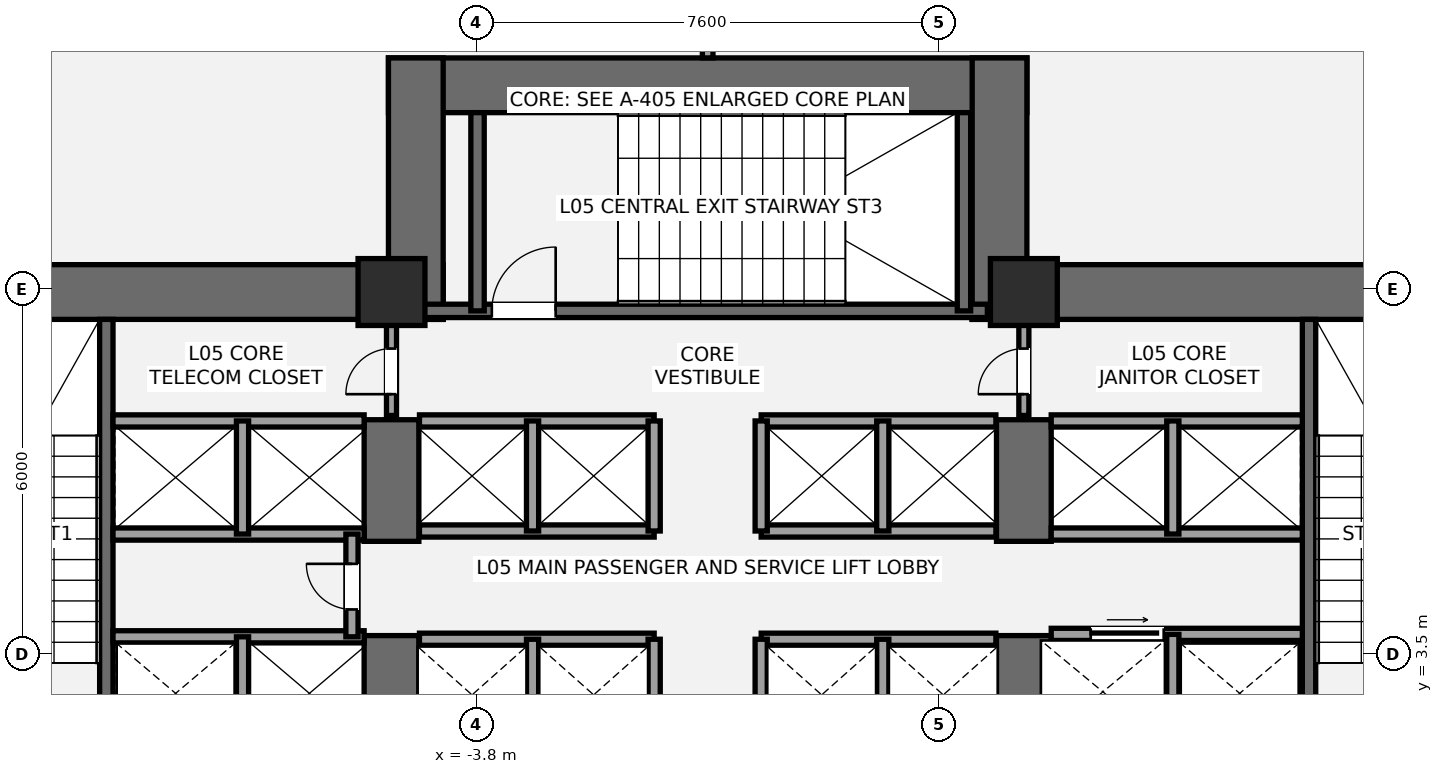
"""IFC4 building model, lengths in metres.
Left out: names, types, materials, properties, quantities, classifications, styles, units other than length and angle.
Written with IfcOpenShell. Run it as: python <this file> out.ifc"""

import sys

from ifc_helpers import new_model, si_unit, direction, frame, frame_2d, origin, origin_2d, place, context, subcontext, project, spatial, rectangle, extrude, element, fill, save


model = new_model("IFC4")
c1 = context("Model", 3, precision=1e-05, world=origin(), true_north=direction((0.0, 1.0)))
c2 = subcontext(c1, "Body", "Model", "MODEL_VIEW")
j1 = project(units=[si_unit("LENGTHUNIT", "METRE"), si_unit("PLANEANGLEUNIT", "RADIAN")], contexts=[c1])
p1 = place(None, origin())
s1 = spatial("IfcSite", under=j1, at=p1, CompositionType="ELEMENT")
p2 = place(p1, origin())
s2 = spatial("IfcBuilding", under=s1, at=p2, CompositionType="ELEMENT")
p3 = place(p2, frame((0.0, 0.0, 22.8)))
s3 = spatial("IfcBuildingStorey", under=s2, at=p3, CompositionType="ELEMENT", Elevation=22.8)
p4 = place(p3, frame((-14.05, 9.45, 0.0), z_axis=(0.0, 0.0, 1.0), x_axis=(1.0, 0.0, 0.0)))
e1 = element("IfcWall", 1, at=p4, inside=s3, PredefinedType="SHEAR", context=c2, shape_type="SweptSolid", body=[
    extrude(rectangle(XDim=9.7, YDim=0.9, at=frame_2d((4.85, 0.0))), origin(), (0.0, 0.0, 1.0), 4.2),
])
p5 = place(p3, frame((-5.2, 0.95, 0.0), z_axis=(0.0, 0.0, 1.0), x_axis=(0.0, 1.0, 0.0)))
e2 = element("IfcWall", 2, at=p5, inside=s3, PredefinedType="SHEAR", context=c2, shape_type="SweptSolid", body=[
    extrude(rectangle(XDim=2.85, YDim=0.9, at=frame_2d((1.425, 0.0))), origin(), (0.0, 0.0, 1.0), 4.2),
])
p6 = place(p3, frame((-5.2, 5.35, 0.0), z_axis=(0.0, 0.0, 1.0), x_axis=(0.0, 1.0, 0.0)))
e3 = element("IfcWall", 3, at=p6, inside=s3, PredefinedType="SHEAR", context=c2, shape_type="SweptSolid", body=[
    extrude(rectangle(XDim=2.0, YDim=0.9, at=frame_2d((1.0, 0.0))), origin(), (0.0, 0.0, 1.0), 4.2),
])
p7 = place(p3, frame((-9.89, 1.85, 0.0), z_axis=(0.0, 0.0, 1.0), x_axis=(0.0, 1.0, 0.0)))
e4 = element("IfcWall", 4, at=p7, inside=s3, PredefinedType="SHEAR", context=c2, shape_type="SweptSolid", body=[
    extrude(rectangle(XDim=7.15, YDim=0.22, at=frame_2d((3.575, 0.0))), origin(), (0.0, 0.0, 1.0), 4.2),
])
p8 = place(p3, frame((4.35, 9.45, 0.0), z_axis=(0.0, 0.0, 1.0), x_axis=(1.0, 0.0, 0.0)))
e5 = element("IfcWall", 5, at=p8, inside=s3, PredefinedType="SHEAR", context=c2, shape_type="SweptSolid", body=[
    extrude(rectangle(XDim=9.7, YDim=0.9, at=frame_2d((4.85, 0.0))), origin(), (0.0, 0.0, 1.0), 4.2),
])
p9 = place(p3, frame((5.2, 0.95, 0.0), z_axis=(0.0, 0.0, 1.0), x_axis=(0.0, 1.0, 0.0)))
e6 = element("IfcWall", 6, at=p9, inside=s3, PredefinedType="SHEAR", context=c2, shape_type="SweptSolid", body=[
    extrude(rectangle(XDim=2.85, YDim=0.9, at=frame_2d((1.425, 0.0))), origin(), (0.0, 0.0, 1.0), 4.2),
])
p10 = place(p3, frame((5.2, 5.35, 0.0), z_axis=(0.0, 0.0, 1.0), x_axis=(0.0, 1.0, 0.0)))
e7 = element("IfcWall", 7, at=p10, inside=s3, PredefinedType="SHEAR", context=c2, shape_type="SweptSolid", body=[
    extrude(rectangle(XDim=2.0, YDim=0.9, at=frame_2d((1.0, 0.0))), origin(), (0.0, 0.0, 1.0), 4.2),
])
p11 = place(p3, frame((9.89, 1.85, 0.0), z_axis=(0.0, 0.0, 1.0), x_axis=(0.0, 1.0, 0.0)))
e8 = element("IfcWall", 8, at=p11, inside=s3, PredefinedType="SHEAR", context=c2, shape_type="SweptSolid", body=[
    extrude(rectangle(XDim=7.15, YDim=0.22, at=frame_2d((3.575, 0.0))), origin(), (0.0, 0.0, 1.0), 4.2),
])
p12 = place(p3, frame((-5.25, 12.85, 0.0), z_axis=(0.0, 0.0, 1.0), x_axis=(1.0, 0.0, 0.0)))
e9 = element("IfcWall", 9, at=p12, inside=s3, PredefinedType="SHEAR", context=c2, shape_type="SweptSolid", body=[
    extrude(rectangle(XDim=10.5, YDim=0.9, at=frame_2d((5.25, 0.0))), origin(), (0.0, 0.0, 1.0), 4.2),
])
for number, where, z_axis, x_axis in (
    (10, (-4.8, 9.0, 0.0), (0.0, 0.0, 1.0), (0.0, 1.0, 0.0)),
    (11, (4.8, 9.0, 0.0), (0.0, 0.0, 1.0), (0.0, 1.0, 0.0)),
):
    element("IfcWall", number, at=place(p3, frame(where, z_axis=z_axis, x_axis=x_axis)), inside=s3, PredefinedType="SHEAR", context=c2, shape_type="SweptSolid", body=[
        extrude(rectangle(XDim=4.3, YDim=0.9, at=frame_2d((2.15, 0.0))), origin(), (0.0, 0.0, 1.0), 4.2),
    ])
p13 = place(p3, frame((-4.7, 9.14, 0.0), z_axis=(0.0, 0.0, 1.0), x_axis=(1.0, 0.0, 0.0)))
e12 = element("IfcWall", 12, at=p13, inside=s3, PredefinedType="SHEAR", context=c2, shape_type="SweptSolid", body=[
    extrude(rectangle(XDim=9.3, YDim=0.22, at=frame_2d((4.65, 0.0))), origin(), (0.0, 0.0, 1.0), 4.2),
])
p14 = place(p13, frame((1.15, 0.0, 0.0)))
e13 = element("IfcOpeningElement", 13, at=p14, cuts=e12, PredefinedType="OPENING", context=c2, shape_type="SweptSolid", body=[
    extrude(rectangle(XDim=1.05, YDim=2.15, at=frame_2d((0.525, 1.075))), frame((0.0, 0.12, 0.0), z_axis=(0.0, -1.0, 0.0), x_axis=(1.0, 0.0, 0.0)), (0.0, 0.0, 1.0), 0.24),
])
for number, where, z_axis, x_axis in (
    (14, (-3.785, 9.14, 0.0), (0.0, 0.0, 1.0), (0.0, 1.0, 0.0)),
    (15, (4.215, 9.14, 0.0), (0.0, 0.0, 1.0), (0.0, 1.0, 0.0)),
):
    element("IfcWall", number, at=place(p3, frame(where, z_axis=z_axis, x_axis=x_axis)), inside=s3, PredefinedType="SHEAR", context=c2, shape_type="SweptSolid", body=[
        extrude(rectangle(XDim=3.26, YDim=0.22, at=frame_2d((1.63, 0.0))), origin(), (0.0, 0.0, 1.0), 4.2),
    ])
for number, where, z_axis, x_axis in (
    (16, (-5.2, 9.45, 0.0), (0.0, 0.0, 1.0), (1.0, 0.0, 0.0)),
    (17, (5.2, 9.45, 0.0), (0.0, 0.0, 1.0), (1.0, 0.0, 0.0)),
):
    element("IfcColumn", number, at=place(p3, frame(where, z_axis=z_axis, x_axis=x_axis)), inside=s3, PredefinedType="COLUMN", context=c2, shape_type="SweptSolid", body=[
        extrude(rectangle(XDim=1.1, YDim=1.1, at=origin_2d()), origin(), (0.0, 0.0, 1.0), 4.2),
    ])
p15 = place(p3, frame((-9.78, 3.78, 0.0), z_axis=(0.0, 0.0, 1.0), x_axis=(1.0, 0.0, 0.0)))
e18 = element("IfcWall", 18, at=p15, inside=s3, PredefinedType="SOLIDWALL", context=c2, shape_type="SweptSolid", body=[
    extrude(rectangle(XDim=4.13, YDim=0.2, at=frame_2d((2.065, 0.0))), origin(), (0.0, 0.0, 1.0), 3.9),
])
p16 = place(p3, frame((-7.65, 1.85, 0.0), z_axis=(0.0, 0.0, 1.0), x_axis=(0.0, 1.0, 0.0)))
e19 = element("IfcWall", 19, at=p16, inside=s3, PredefinedType="SOLIDWALL", context=c2, shape_type="SweptSolid", body=[
    extrude(rectangle(XDim=1.93, YDim=0.2, at=frame_2d((0.965, 0.0))), origin(), (0.0, 0.0, 1.0), 3.9),
])
for number, where, z_axis, x_axis in (
    (20, (-9.78, 5.47, 0.0), (0.0, 0.0, 1.0), (1.0, 0.0, 0.0)),
    (21, (-9.78, 7.33, 0.0), (0.0, 0.0, 1.0), (1.0, 0.0, 0.0)),
):
    element("IfcWall", number, at=place(p3, frame(where, z_axis=z_axis, x_axis=x_axis)), inside=s3, PredefinedType="SOLIDWALL", context=c2, shape_type="SweptSolid", body=[
        extrude(rectangle(XDim=4.13, YDim=0.2, at=frame_2d((2.065, 0.0))), origin(), (0.0, 0.0, 1.0), 3.9),
    ])
p17 = place(p3, frame((-7.65, 5.47, 0.0), z_axis=(0.0, 0.0, 1.0), x_axis=(0.0, 1.0, 0.0)))
e22 = element("IfcWall", 22, at=p17, inside=s3, PredefinedType="SOLIDWALL", context=c2, shape_type="SweptSolid", body=[
    extrude(rectangle(XDim=1.86, YDim=0.2, at=frame_2d((0.93, 0.0))), origin(), (0.0, 0.0, 1.0), 3.9),
])
p18 = place(p3, frame((-5.85, 3.78, 0.0), z_axis=(0.0, 0.0, 1.0), x_axis=(0.0, 1.0, 0.0)))
e23 = element("IfcWall", 23, at=p18, inside=s3, PredefinedType="SOLIDWALL", context=c2, shape_type="SweptSolid", body=[
    extrude(rectangle(XDim=1.69, YDim=0.2, at=frame_2d((0.845, 0.0))), origin(), (0.0, 0.0, 1.0), 3.9),
])
p19 = place(p18, frame((0.45, 0.0, 0.0)))
e24 = element("IfcOpeningElement", 24, at=p19, cuts=e23, PredefinedType="OPENING", context=c2, shape_type="SweptSolid", body=[
    extrude(rectangle(XDim=0.75, YDim=2.1, at=frame_2d((0.375, 1.05))), frame((0.0, 0.11, 0.0), z_axis=(0.0, -1.0, 0.0), x_axis=(1.0, 0.0, 0.0)), (0.0, 0.0, 1.0), 0.22),
])
p20 = place(p3, frame((5.65, 3.82, 0.0), z_axis=(0.0, 0.0, 1.0), x_axis=(1.0, 0.0, 0.0)))
e25 = element("IfcWall", 25, at=p20, inside=s3, PredefinedType="SOLIDWALL", context=c2, shape_type="SweptSolid", body=[
    extrude(rectangle(XDim=4.13, YDim=0.2, at=frame_2d((2.065, 0.0))), origin(), (0.0, 0.0, 1.0), 3.9),
])
p21 = place(p20, frame((0.65, 0.0, 0.0)))
e26 = element("IfcOpeningElement", 26, at=p21, cuts=e25, PredefinedType="OPENING", context=c2, shape_type="SweptSolid", body=[
    extrude(rectangle(XDim=1.2, YDim=2.2, at=frame_2d((0.6, 1.1))), frame((0.0, 0.11, 0.0), z_axis=(0.0, -1.0, 0.0), x_axis=(1.0, 0.0, 0.0)), (0.0, 0.0, 1.0), 0.22),
])
p22 = place(p3, frame((7.65, 1.85, 0.0), z_axis=(0.0, 0.0, 1.0), x_axis=(0.0, 1.0, 0.0)))
e27 = element("IfcWall", 27, at=p22, inside=s3, PredefinedType="SOLIDWALL", context=c2, shape_type="SweptSolid", body=[
    extrude(rectangle(XDim=1.97, YDim=0.2, at=frame_2d((0.985, 0.0))), origin(), (0.0, 0.0, 1.0), 3.9),
])
for number, where, z_axis, x_axis in (
    (28, (5.65, 5.47, 0.0), (0.0, 0.0, 1.0), (1.0, 0.0, 0.0)),
    (29, (5.65, 7.33, 0.0), (0.0, 0.0, 1.0), (1.0, 0.0, 0.0)),
):
    element("IfcWall", number, at=place(p3, frame(where, z_axis=z_axis, x_axis=x_axis)), inside=s3, PredefinedType="SOLIDWALL", context=c2, shape_type="SweptSolid", body=[
        extrude(rectangle(XDim=4.13, YDim=0.2, at=frame_2d((2.065, 0.0))), origin(), (0.0, 0.0, 1.0), 3.9),
    ])
p23 = place(p3, frame((7.65, 5.47, 0.0), z_axis=(0.0, 0.0, 1.0), x_axis=(0.0, 1.0, 0.0)))
e30 = element("IfcWall", 30, at=p23, inside=s3, PredefinedType="SOLIDWALL", context=c2, shape_type="SweptSolid", body=[
    extrude(rectangle(XDim=1.86, YDim=0.2, at=frame_2d((0.93, 0.0))), origin(), (0.0, 0.0, 1.0), 3.9),
])
for number, where, z_axis, x_axis in (
    (31, (-4.74, 3.74, 0.0), (0.0, 0.0, 1.0), (1.0, 0.0, 0.0)),
    (32, (0.88, 3.74, 0.0), (0.0, 0.0, 1.0), (1.0, 0.0, 0.0)),
):
    element("IfcWall", number, at=place(p3, frame(where, z_axis=z_axis, x_axis=x_axis)), inside=s3, PredefinedType="SOLIDWALL", context=c2, shape_type="SweptSolid", body=[
        extrude(rectangle(XDim=3.86, YDim=0.2, at=frame_2d((1.93, 0.0))), origin(), (0.0, 0.0, 1.0), 3.9),
    ])
for number, where, z_axis, x_axis in (
    (33, (-2.88, 1.92, 0.0), (0.0, 0.0, 1.0), (0.0, 1.0, 0.0)),
    (34, (2.88, 1.92, 0.0), (0.0, 0.0, 1.0), (0.0, 1.0, 0.0)),
    (35, (-0.88, 1.92, 0.0), (0.0, 0.0, 1.0), (0.0, 1.0, 0.0)),
    (36, (0.88, 1.92, 0.0), (0.0, 0.0, 1.0), (0.0, 1.0, 0.0)),
):
    element("IfcWall", number, at=place(p3, frame(where, z_axis=z_axis, x_axis=x_axis)), inside=s3, PredefinedType="SOLIDWALL", context=c2, shape_type="SweptSolid", body=[
        extrude(rectangle(XDim=1.82, YDim=0.2, at=frame_2d((0.91, 0.0))), origin(), (0.0, 0.0, 1.0), 3.9),
    ])
for number, where, z_axis, x_axis in (
    (37, (-4.74, 5.52, 0.0), (0.0, 0.0, 1.0), (1.0, 0.0, 0.0)),
    (38, (0.88, 5.52, 0.0), (0.0, 0.0, 1.0), (1.0, 0.0, 0.0)),
    (39, (-4.74, 7.33, 0.0), (0.0, 0.0, 1.0), (1.0, 0.0, 0.0)),
    (40, (0.88, 7.33, 0.0), (0.0, 0.0, 1.0), (1.0, 0.0, 0.0)),
):
    element("IfcWall", number, at=place(p3, frame(where, z_axis=z_axis, x_axis=x_axis)), inside=s3, PredefinedType="SOLIDWALL", context=c2, shape_type="SweptSolid", body=[
        extrude(rectangle(XDim=3.86, YDim=0.2, at=frame_2d((1.93, 0.0))), origin(), (0.0, 0.0, 1.0), 3.9),
    ])
for number, where, z_axis, x_axis in (
    (41, (-2.88, 5.52, 0.0), (0.0, 0.0, 1.0), (0.0, 1.0, 0.0)),
    (42, (2.88, 5.52, 0.0), (0.0, 0.0, 1.0), (0.0, 1.0, 0.0)),
    (43, (-0.88, 5.52, 0.0), (0.0, 0.0, 1.0), (0.0, 1.0, 0.0)),
    (44, (0.88, 5.52, 0.0), (0.0, 0.0, 1.0), (0.0, 1.0, 0.0)),
):
    element("IfcWall", number, at=place(p3, frame(where, z_axis=z_axis, x_axis=x_axis)), inside=s3, PredefinedType="SOLIDWALL", context=c2, shape_type="SweptSolid", body=[
        extrude(rectangle(XDim=1.81, YDim=0.2, at=frame_2d((0.905, 0.0))), origin(), (0.0, 0.0, 1.0), 3.9),
    ])
p24 = place(p3, frame((-5.2, 7.42, 0.0), z_axis=(0.0, 0.0, 1.0), x_axis=(0.0, 1.0, 0.0)))
e45 = element("IfcWall", 45, at=p24, inside=s3, PredefinedType="PARTITIONING", context=c2, shape_type="SweptSolid", body=[
    extrude(rectangle(XDim=1.58, YDim=0.165, at=frame_2d((0.79, 0.0))), origin(), (0.0, 0.0, 1.0), 3.9),
])
p25 = place(p24, frame((0.35, 0.0, 0.0)))
e46 = element("IfcOpeningElement", 46, at=p25, cuts=e45, PredefinedType="OPENING", context=c2, shape_type="SweptSolid", body=[
    extrude(rectangle(XDim=0.75, YDim=2.1, at=frame_2d((0.375, 1.05))), frame((0.0, 0.093, 0.0), z_axis=(0.0, -1.0, 0.0), x_axis=(1.0, 0.0, 0.0)), (0.0, 0.0, 1.0), 0.185),
])
p26 = place(p3, frame((5.2, 7.42, 0.0), z_axis=(0.0, 0.0, 1.0), x_axis=(0.0, 1.0, 0.0)))
e47 = element("IfcWall", 47, at=p26, inside=s3, PredefinedType="PARTITIONING", context=c2, shape_type="SweptSolid", body=[
    extrude(rectangle(XDim=1.58, YDim=0.165, at=frame_2d((0.79, 0.0))), origin(), (0.0, 0.0, 1.0), 3.9),
])
p27 = place(p26, frame((0.35, 0.0, 0.0)))
e48 = element("IfcOpeningElement", 48, at=p27, cuts=e47, PredefinedType="OPENING", context=c2, shape_type="SweptSolid", body=[
    extrude(rectangle(XDim=0.75, YDim=2.1, at=frame_2d((0.375, 1.05))), frame((0.0, 0.093, 0.0), z_axis=(0.0, -1.0, 0.0), x_axis=(1.0, 0.0, 0.0)), (0.0, 0.0, 1.0), 0.185),
])
p28 = place(p3, frame((0.0, 13.3, 0.0), z_axis=(0.0, 0.0, 1.0), x_axis=(0.0, 1.0, 0.0)))
e49 = element("IfcWall", 49, at=p28, inside=s3, PredefinedType="PARTITIONING", context=c2, shape_type="SweptSolid", body=[
    extrude(rectangle(XDim=8.106, YDim=0.175, at=frame_2d((4.053, 0.0))), origin(), (0.0, 0.0, 1.0), 2.09),
])
p29 = place(p14, origin())
e50 = element("IfcDoor", 50, at=p29, inside=s3, OperationType="SINGLE_SWING_RIGHT", PredefinedType="DOOR", context=c2, shape_type="SweptSolid", body=[
    extrude(rectangle(XDim=1.05, YDim=2.15, at=frame_2d((0.525, 1.075))), frame((0.0, 0.025, 0.0), z_axis=(0.0, -1.0, 0.0), x_axis=(1.0, 0.0, 0.0)), (0.0, 0.0, 1.0), 0.05),
])
fill(e13, e50)
p30 = place(p19, origin())
e51 = element("IfcDoor", 51, at=p30, inside=s3, OperationType="SINGLE_SWING_RIGHT", PredefinedType="DOOR", context=c2, shape_type="SweptSolid", body=[
    extrude(rectangle(XDim=0.75, YDim=2.1, at=frame_2d((0.375, 1.05))), frame((0.0, 0.025, 0.0), z_axis=(0.0, -1.0, 0.0), x_axis=(1.0, 0.0, 0.0)), (0.0, 0.0, 1.0), 0.05),
])
fill(e24, e51)
p31 = place(p21, origin())
e52 = element("IfcDoor", 52, at=p31, inside=s3, OperationType="SLIDING_TO_RIGHT", PredefinedType="DOOR", context=c2, shape_type="SweptSolid", body=[
    extrude(rectangle(XDim=1.2, YDim=2.2, at=frame_2d((0.6, 1.1))), frame((0.0, 0.025, 0.0), z_axis=(0.0, -1.0, 0.0), x_axis=(1.0, 0.0, 0.0)), (0.0, 0.0, 1.0), 0.05),
])
fill(e26, e52)
p32 = place(p25, origin())
e53 = element("IfcDoor", 53, at=p32, inside=s3, OperationType="SINGLE_SWING_LEFT", PredefinedType="DOOR", context=c2, shape_type="SweptSolid", body=[
    extrude(rectangle(XDim=0.75, YDim=2.1, at=frame_2d((0.375, 1.05))), frame((0.0, 0.025, 0.0), z_axis=(0.0, -1.0, 0.0), x_axis=(1.0, 0.0, 0.0)), (0.0, 0.0, 1.0), 0.05),
])
fill(e46, e53)
p33 = place(p27, origin())
e54 = element("IfcDoor", 54, at=p33, inside=s3, OperationType="SINGLE_SWING_LEFT", PredefinedType="DOOR", context=c2, shape_type="SweptSolid", body=[
    extrude(rectangle(XDim=0.75, YDim=2.1, at=frame_2d((0.375, 1.05))), frame((0.0, 0.025, 0.0), z_axis=(0.0, -1.0, 0.0), x_axis=(1.0, 0.0, 0.0)), (0.0, 0.0, 1.0), 0.05),
])
fill(e48, e54)
save(model, sys.argv[1])
